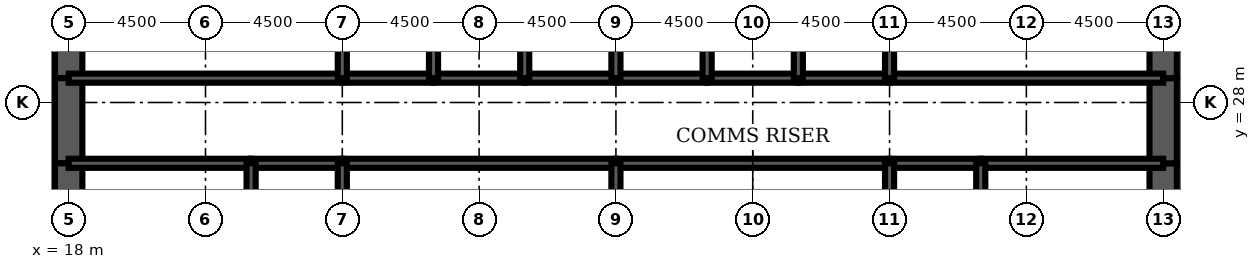
"""IFC4 building model, lengths in metres.
Left out: names, types, materials, properties, quantities, classifications, styles, units other than length and angle.
Written with IfcOpenShell. Run it as: python <this file> out.ifc"""

import sys

from ifc_helpers import new_model, si_unit, direction, frame, frame_2d, origin, place, context, subcontext, project, spatial, rectangle, extrude, element, fill, save


model = new_model("IFC4")
c1 = context("Model", 3, precision=1e-05, world=origin(), true_north=direction((0.0, 1.0)))
c2 = subcontext(c1, "Body", "Model", "MODEL_VIEW")
j1 = project(units=[si_unit("LENGTHUNIT", "METRE"), si_unit("PLANEANGLEUNIT", "RADIAN")], contexts=[c1])
p1 = place(None, origin())
s1 = spatial("IfcSite", under=j1, at=p1, CompositionType="ELEMENT")
p2 = place(p1, origin())
s2 = spatial("IfcBuilding", under=s1, at=p2, CompositionType="ELEMENT")
p3 = place(p2, frame((0.0, 0.0, 104.7)))
s3 = spatial("IfcBuildingStorey", under=s2, at=p3, CompositionType="ELEMENT", Elevation=104.7)
p4 = place(p3, frame((18.0, 32.0, 0.0), z_axis=(0.0, 0.0, 1.0), x_axis=(0.0, -1.0, 0.0)))
e1 = element("IfcWall", 1, at=p4, inside=s3, PredefinedType="SHEAR", context=c2, shape_type="SweptSolid", body=[
    extrude(rectangle(XDim=3.2, YDim=0.9, at=frame_2d((1.6, 0.0))), origin(), (0.0, 0.0, 1.0), 4.2),
])
p5 = place(p3, frame((18.0, 28.8, 0.0), z_axis=(0.0, 0.0, 1.0), x_axis=(0.0, -1.0, 0.0)))
e2 = element("IfcWall", 2, at=p5, inside=s3, PredefinedType="SHEAR", context=c2, shape_type="SweptSolid", body=[
    extrude(rectangle(XDim=2.8, YDim=0.9, at=frame_2d((1.4, 0.0))), origin(), (0.0, 0.0, 1.0), 4.2),
])
p6 = place(p5, frame((0.4, 0.0, 0.0)))
e3 = element("IfcOpeningElement", 3, at=p6, cuts=e2, PredefinedType="OPENING", context=c2, shape_type="SweptSolid", body=[
    extrude(rectangle(XDim=1.8, YDim=2.1, at=frame_2d((0.9, 1.05))), frame((0.0, 0.46, 0.0), z_axis=(0.0, -1.0, 0.0), x_axis=(1.0, 0.0, 0.0)), (0.0, 0.0, 1.0), 0.92),
])
for number, where, z_axis, x_axis in (
    (4, (18.0, 26.0, 0.0), (0.0, 0.0, 1.0), (0.0, -1.0, 0.0)),
    (5, (54.0, 22.0, 0.0), (0.0, 0.0, 1.0), (0.0, 1.0, 0.0)),
):
    element("IfcWall", number, at=place(p3, frame(where, z_axis=z_axis, x_axis=x_axis)), inside=s3, PredefinedType="SHEAR", context=c2, shape_type="SweptSolid", body=[
        extrude(rectangle(XDim=4.0, YDim=0.9, at=frame_2d((2.0, 0.0))), origin(), (0.0, 0.0, 1.0), 4.2),
    ])
p7 = place(p3, frame((54.0, 26.0, 0.0), z_axis=(0.0, 0.0, 1.0), x_axis=(0.0, 1.0, 0.0)))
e6 = element("IfcWall", 6, at=p7, inside=s3, PredefinedType="SHEAR", context=c2, shape_type="SweptSolid", body=[
    extrude(rectangle(XDim=2.8, YDim=0.9, at=frame_2d((1.4, 0.0))), origin(), (0.0, 0.0, 1.0), 4.2),
])
p8 = place(p7, frame((0.6, 0.0, 0.0)))
e7 = element("IfcOpeningElement", 7, at=p8, cuts=e6, PredefinedType="OPENING", context=c2, shape_type="SweptSolid", body=[
    extrude(rectangle(XDim=1.8, YDim=2.1, at=frame_2d((0.9, 1.05))), frame((0.0, 0.46, 0.0), z_axis=(0.0, -1.0, 0.0), x_axis=(1.0, 0.0, 0.0)), (0.0, 0.0, 1.0), 0.92),
])
p9 = place(p3, frame((54.0, 28.8, 0.0), z_axis=(0.0, 0.0, 1.0), x_axis=(0.0, 1.0, 0.0)))
e8 = element("IfcWall", 8, at=p9, inside=s3, PredefinedType="SHEAR", context=c2, shape_type="SweptSolid", body=[
    extrude(rectangle(XDim=3.2, YDim=0.9, at=frame_2d((1.6, 0.0))), origin(), (0.0, 0.0, 1.0), 4.2),
])
p10 = place(p3, frame((18.0, 28.8, 0.0), z_axis=(0.0, 0.0, 1.0), x_axis=(1.0, 0.0, 0.0)))
e9 = element("IfcWall", 9, at=p10, inside=s3, PredefinedType="SOLIDWALL", context=c2, shape_type="SweptSolid", body=[
    extrude(rectangle(XDim=9.0, YDim=0.3, at=frame_2d((4.5, 0.0))), origin(), (0.0, 0.0, 1.0), 4.2),
])
p11 = place(p10, frame((0.65, 0.0, 0.0)))
e10 = element("IfcOpeningElement", 10, at=p11, cuts=e9, PredefinedType="OPENING", context=c2, shape_type="SweptSolid", body=[
    extrude(rectangle(XDim=1.0, YDim=2.1, at=frame_2d((0.5, 1.05))), frame((0.0, 0.16, 0.0), z_axis=(0.0, -1.0, 0.0), x_axis=(1.0, 0.0, 0.0)), (0.0, 0.0, 1.0), 0.32),
])
p12 = place(p3, frame((27.0, 28.8, 0.0), z_axis=(0.0, 0.0, 1.0), x_axis=(1.0, 0.0, 0.0)))
e11 = element("IfcWall", 11, at=p12, inside=s3, PredefinedType="SOLIDWALL", context=c2, shape_type="SweptSolid", body=[
    extrude(rectangle(XDim=3.0, YDim=0.3, at=frame_2d((1.5, 0.0))), origin(), (0.0, 0.0, 1.0), 4.2),
])
p13 = place(p12, frame((0.95, 0.0, 0.0)))
e12 = element("IfcOpeningElement", 12, at=p13, cuts=e11, PredefinedType="OPENING", context=c2, shape_type="SweptSolid", body=[
    extrude(rectangle(XDim=1.1, YDim=2.2, at=frame_2d((0.55, 1.1))), frame((0.0, 0.16, 0.0), z_axis=(0.0, -1.0, 0.0), x_axis=(1.0, 0.0, 0.0)), (0.0, 0.0, 1.0), 0.32),
])
p14 = place(p3, frame((30.0, 28.8, 0.0), z_axis=(0.0, 0.0, 1.0), x_axis=(1.0, 0.0, 0.0)))
e13 = element("IfcWall", 13, at=p14, inside=s3, PredefinedType="SOLIDWALL", context=c2, shape_type="SweptSolid", body=[
    extrude(rectangle(XDim=3.0, YDim=0.3, at=frame_2d((1.5, 0.0))), origin(), (0.0, 0.0, 1.0), 4.2),
])
p15 = place(p14, frame((0.95, 0.0, 0.0)))
e14 = element("IfcOpeningElement", 14, at=p15, cuts=e13, PredefinedType="OPENING", context=c2, shape_type="SweptSolid", body=[
    extrude(rectangle(XDim=1.1, YDim=2.2, at=frame_2d((0.55, 1.1))), frame((0.0, 0.16, 0.0), z_axis=(0.0, -1.0, 0.0), x_axis=(1.0, 0.0, 0.0)), (0.0, 0.0, 1.0), 0.32),
])
p16 = place(p3, frame((33.0, 28.8, 0.0), z_axis=(0.0, 0.0, 1.0), x_axis=(1.0, 0.0, 0.0)))
e15 = element("IfcWall", 15, at=p16, inside=s3, PredefinedType="SOLIDWALL", context=c2, shape_type="SweptSolid", body=[
    extrude(rectangle(XDim=3.0, YDim=0.3, at=frame_2d((1.5, 0.0))), origin(), (0.0, 0.0, 1.0), 4.2),
])
p17 = place(p16, frame((0.95, 0.0, 0.0)))
e16 = element("IfcOpeningElement", 16, at=p17, cuts=e15, PredefinedType="OPENING", context=c2, shape_type="SweptSolid", body=[
    extrude(rectangle(XDim=1.1, YDim=2.2, at=frame_2d((0.55, 1.1))), frame((0.0, 0.16, 0.0), z_axis=(0.0, -1.0, 0.0), x_axis=(1.0, 0.0, 0.0)), (0.0, 0.0, 1.0), 0.32),
])
for number, where, z_axis, x_axis in (
    (17, (36.0, 28.8, 0.0), (0.0, 0.0, 1.0), (1.0, 0.0, 0.0)),
    (18, (39.0, 28.8, 0.0), (0.0, 0.0, 1.0), (1.0, 0.0, 0.0)),
):
    element("IfcWall", number, at=place(p3, frame(where, z_axis=z_axis, x_axis=x_axis)), inside=s3, PredefinedType="SOLIDWALL", context=c2, shape_type="SweptSolid", body=[
        extrude(rectangle(XDim=3.0, YDim=0.3, at=frame_2d((1.5, 0.0))), origin(), (0.0, 0.0, 1.0), 4.2),
    ])
p18 = place(p3, frame((42.0, 28.8, 0.0), z_axis=(0.0, 0.0, 1.0), x_axis=(1.0, 0.0, 0.0)))
e19 = element("IfcWall", 19, at=p18, inside=s3, PredefinedType="SOLIDWALL", context=c2, shape_type="SweptSolid", body=[
    extrude(rectangle(XDim=3.0, YDim=0.3, at=frame_2d((1.5, 0.0))), origin(), (0.0, 0.0, 1.0), 4.2),
])
p19 = place(p18, frame((0.95, 0.0, 0.0)))
e20 = element("IfcOpeningElement", 20, at=p19, cuts=e19, PredefinedType="OPENING", context=c2, shape_type="SweptSolid", body=[
    extrude(rectangle(XDim=1.1, YDim=2.2, at=frame_2d((0.55, 1.1))), frame((0.0, 0.16, 0.0), z_axis=(0.0, -1.0, 0.0), x_axis=(1.0, 0.0, 0.0)), (0.0, 0.0, 1.0), 0.32),
])
p20 = place(p3, frame((45.0, 28.8, 0.0), z_axis=(0.0, 0.0, 1.0), x_axis=(1.0, 0.0, 0.0)))
e21 = element("IfcWall", 21, at=p20, inside=s3, PredefinedType="SOLIDWALL", context=c2, shape_type="SweptSolid", body=[
    extrude(rectangle(XDim=9.0, YDim=0.3, at=frame_2d((4.5, 0.0))), origin(), (0.0, 0.0, 1.0), 4.2),
])
p21 = place(p20, frame((7.35, 0.0, 0.0)))
e22 = element("IfcOpeningElement", 22, at=p21, cuts=e21, PredefinedType="OPENING", context=c2, shape_type="SweptSolid", body=[
    extrude(rectangle(XDim=1.0, YDim=2.1, at=frame_2d((0.5, 1.05))), frame((0.0, 0.16, 0.0), z_axis=(0.0, -1.0, 0.0), x_axis=(1.0, 0.0, 0.0)), (0.0, 0.0, 1.0), 0.32),
])
p22 = place(p3, frame((18.0, 26.0, 0.0), z_axis=(0.0, 0.0, 1.0), x_axis=(1.0, 0.0, 0.0)))
e23 = element("IfcWall", 23, at=p22, inside=s3, PredefinedType="SOLIDWALL", context=c2, shape_type="SweptSolid", body=[
    extrude(rectangle(XDim=6.0, YDim=0.3, at=frame_2d((3.0, 0.0))), origin(), (0.0, 0.0, 1.0), 4.2),
])
p23 = place(p3, frame((24.0, 26.0, 0.0), z_axis=(0.0, 0.0, 1.0), x_axis=(1.0, 0.0, 0.0)))
e24 = element("IfcWall", 24, at=p23, inside=s3, PredefinedType="SOLIDWALL", context=c2, shape_type="SweptSolid", body=[
    extrude(rectangle(XDim=3.0, YDim=0.3, at=frame_2d((1.5, 0.0))), origin(), (0.0, 0.0, 1.0), 4.2),
])
for number, where, z_axis, x_axis in (
    (25, (27.0, 26.0, 0.0), (0.0, 0.0, 1.0), (1.0, 0.0, 0.0)),
    (26, (36.0, 26.0, 0.0), (0.0, 0.0, 1.0), (1.0, 0.0, 0.0)),
):
    element("IfcWall", number, at=place(p3, frame(where, z_axis=z_axis, x_axis=x_axis)), inside=s3, PredefinedType="SOLIDWALL", context=c2, shape_type="SweptSolid", body=[
        extrude(rectangle(XDim=9.0, YDim=0.3, at=frame_2d((4.5, 0.0))), origin(), (0.0, 0.0, 1.0), 4.2),
    ])
p24 = place(p3, frame((45.0, 26.0, 0.0), z_axis=(0.0, 0.0, 1.0), x_axis=(1.0, 0.0, 0.0)))
e27 = element("IfcWall", 27, at=p24, inside=s3, PredefinedType="SOLIDWALL", context=c2, shape_type="SweptSolid", body=[
    extrude(rectangle(XDim=3.0, YDim=0.3, at=frame_2d((1.5, 0.0))), origin(), (0.0, 0.0, 1.0), 4.2),
])
p25 = place(p3, frame((48.0, 26.0, 0.0), z_axis=(0.0, 0.0, 1.0), x_axis=(1.0, 0.0, 0.0)))
e28 = element("IfcWall", 28, at=p25, inside=s3, PredefinedType="SOLIDWALL", context=c2, shape_type="SweptSolid", body=[
    extrude(rectangle(XDim=6.0, YDim=0.3, at=frame_2d((3.0, 0.0))), origin(), (0.0, 0.0, 1.0), 4.2),
])
for number, where, z_axis, x_axis in (
    (29, (27.0, 28.8, 0.0), (0.0, 0.0, 1.0), (0.0, 1.0, 0.0)),
    (30, (30.0, 28.8, 0.0), (0.0, 0.0, 1.0), (0.0, 1.0, 0.0)),
    (31, (33.0, 28.8, 0.0), (0.0, 0.0, 1.0), (0.0, 1.0, 0.0)),
    (32, (36.0, 28.8, 0.0), (0.0, 0.0, 1.0), (0.0, 1.0, 0.0)),
    (33, (39.0, 28.8, 0.0), (0.0, 0.0, 1.0), (0.0, 1.0, 0.0)),
    (34, (42.0, 28.8, 0.0), (0.0, 0.0, 1.0), (0.0, 1.0, 0.0)),
    (35, (45.0, 28.8, 0.0), (0.0, 0.0, 1.0), (0.0, 1.0, 0.0)),
):
    element("IfcWall", number, at=place(p3, frame(where, z_axis=z_axis, x_axis=x_axis)), inside=s3, PredefinedType="SOLIDWALL", context=c2, shape_type="SweptSolid", body=[
        extrude(rectangle(XDim=3.2, YDim=0.3, at=frame_2d((1.6, 0.0))), origin(), (0.0, 0.0, 1.0), 4.2),
    ])
for number, where, z_axis, x_axis in (
    (36, (24.0, 22.0, 0.0), (0.0, 0.0, 1.0), (0.0, 1.0, 0.0)),
    (37, (27.0, 22.0, 0.0), (0.0, 0.0, 1.0), (0.0, 1.0, 0.0)),
    (38, (36.0, 22.0, 0.0), (0.0, 0.0, 1.0), (0.0, 1.0, 0.0)),
    (39, (45.0, 22.0, 0.0), (0.0, 0.0, 1.0), (0.0, 1.0, 0.0)),
    (40, (48.0, 22.0, 0.0), (0.0, 0.0, 1.0), (0.0, 1.0, 0.0)),
):
    element("IfcWall", number, at=place(p3, frame(where, z_axis=z_axis, x_axis=x_axis)), inside=s3, PredefinedType="SOLIDWALL", context=c2, shape_type="SweptSolid", body=[
        extrude(rectangle(XDim=4.0, YDim=0.3, at=frame_2d((2.0, 0.0))), origin(), (0.0, 0.0, 1.0), 4.2),
    ])
p26 = place(p3, frame((38.0, 22.15, 0.0), z_axis=(0.0, 0.0, 1.0), x_axis=(0.0, 1.0, 0.0)))
e41 = element("IfcWall", 41, at=p26, inside=s3, PredefinedType="PARTITIONING", context=c2, shape_type="SweptSolid", body=[
    extrude(rectangle(XDim=3.7, YDim=0.15, at=frame_2d((1.85, 0.0))), origin(), (0.0, 0.0, 1.0), 3.0),
])
p27 = place(p26, frame((2.2, 0.0, 0.0)))
e42 = element("IfcOpeningElement", 42, at=p27, cuts=e41, PredefinedType="OPENING", context=c2, shape_type="SweptSolid", body=[
    extrude(rectangle(XDim=1.0, YDim=2.1, at=frame_2d((0.5, 1.05))), frame((0.0, 0.085, 0.0), z_axis=(0.0, -1.0, 0.0), x_axis=(1.0, 0.0, 0.0)), (0.0, 0.0, 1.0), 0.17),
])
for number, where, z_axis, x_axis in (
    (43, (20.025, 22.15, 0.0), (0.0, 0.0, 1.0), (0.0, 1.0, 0.0)),
    (44, (51.975, 22.15, 0.0), (0.0, 0.0, 1.0), (0.0, 1.0, 0.0)),
):
    element("IfcWall", number, at=place(p3, frame(where, z_axis=z_axis, x_axis=x_axis)), inside=s3, PredefinedType="PARTITIONING", context=c2, shape_type="SweptSolid", body=[
        extrude(rectangle(XDim=3.7, YDim=0.15, at=frame_2d((1.85, 0.0))), origin(), (0.0, 0.0, 1.0), 3.0),
    ])
p28 = place(p27, origin())
e45 = element("IfcDoor", 45, at=p28, inside=s3, OperationType="SINGLE_SWING_RIGHT", PredefinedType="DOOR", context=c2, shape_type="SweptSolid", body=[
    extrude(rectangle(XDim=1.0, YDim=2.1, at=frame_2d((0.5, 1.05))), frame((0.0, 0.025, 0.0), z_axis=(0.0, -1.0, 0.0), x_axis=(1.0, 0.0, 0.0)), (0.0, 0.0, 1.0), 0.05),
])
fill(e42, e45)
p29 = place(p19, origin())
e46 = element("IfcDoor", 46, at=p29, inside=s3, OperationType="DOUBLE_DOOR_SLIDING", PredefinedType="USERDEFINED", context=c2, shape_type="SweptSolid", body=[
    extrude(rectangle(XDim=1.1, YDim=2.2, at=frame_2d((0.55, 1.1))), frame((0.0, 0.025, 0.0), z_axis=(0.0, -1.0, 0.0), x_axis=(1.0, 0.0, 0.0)), (0.0, 0.0, 1.0), 0.05),
])
fill(e20, e46)
p30 = place(p13, origin())
e47 = element("IfcDoor", 47, at=p30, inside=s3, OperationType="DOUBLE_DOOR_SLIDING", PredefinedType="USERDEFINED", context=c2, shape_type="SweptSolid", body=[
    extrude(rectangle(XDim=1.1, YDim=2.2, at=frame_2d((0.55, 1.1))), frame((0.0, 0.025, 0.0), z_axis=(0.0, -1.0, 0.0), x_axis=(1.0, 0.0, 0.0)), (0.0, 0.0, 1.0), 0.05),
])
fill(e12, e47)
p31 = place(p15, origin())
e48 = element("IfcDoor", 48, at=p31, inside=s3, OperationType="DOUBLE_DOOR_SLIDING", PredefinedType="USERDEFINED", context=c2, shape_type="SweptSolid", body=[
    extrude(rectangle(XDim=1.1, YDim=2.2, at=frame_2d((0.55, 1.1))), frame((0.0, 0.025, 0.0), z_axis=(0.0, -1.0, 0.0), x_axis=(1.0, 0.0, 0.0)), (0.0, 0.0, 1.0), 0.05),
])
fill(e14, e48)
p32 = place(p17, origin())
e49 = element("IfcDoor", 49, at=p32, inside=s3, OperationType="DOUBLE_DOOR_SLIDING", PredefinedType="USERDEFINED", context=c2, shape_type="SweptSolid", body=[
    extrude(rectangle(XDim=1.1, YDim=2.2, at=frame_2d((0.55, 1.1))), frame((0.0, 0.025, 0.0), z_axis=(0.0, -1.0, 0.0), x_axis=(1.0, 0.0, 0.0)), (0.0, 0.0, 1.0), 0.05),
])
fill(e16, e49)
p33 = place(p11, origin())
e50 = element("IfcDoor", 50, at=p33, inside=s3, OperationType="SINGLE_SWING_LEFT", PredefinedType="DOOR", context=c2, shape_type="SweptSolid", body=[
    extrude(rectangle(XDim=1.0, YDim=2.1, at=frame_2d((0.5, 1.05))), frame((0.0, 0.025, 0.0), z_axis=(0.0, -1.0, 0.0), x_axis=(1.0, 0.0, 0.0)), (0.0, 0.0, 1.0), 0.05),
])
fill(e10, e50)
p34 = place(p21, origin())
e51 = element("IfcDoor", 51, at=p34, inside=s3, OperationType="SINGLE_SWING_RIGHT", PredefinedType="DOOR", context=c2, shape_type="SweptSolid", body=[
    extrude(rectangle(XDim=1.0, YDim=2.1, at=frame_2d((0.5, 1.05))), frame((0.0, 0.025, 0.0), z_axis=(0.0, -1.0, 0.0), x_axis=(1.0, 0.0, 0.0)), (0.0, 0.0, 1.0), 0.05),
])
fill(e22, e51)
p35 = place(p6, origin())
e52 = element("IfcDoor", 52, at=p35, inside=s3, OperationType="SINGLE_SWING_LEFT", PredefinedType="DOOR", context=c2, shape_type="SweptSolid", body=[
    extrude(rectangle(XDim=1.8, YDim=2.1, at=frame_2d((0.9, 1.05))), frame((0.0, 0.45, 0.0), z_axis=(0.0, -1.0, 0.0), x_axis=(1.0, 0.0, 0.0)), (0.0, 0.0, 1.0), 0.899),
])
fill(e3, e52)
p36 = place(p8, origin())
e53 = element("IfcDoor", 53, at=p36, inside=s3, OperationType="SINGLE_SWING_LEFT", PredefinedType="DOOR", context=c2, shape_type="SweptSolid", body=[
    extrude(rectangle(XDim=1.8, YDim=2.1, at=frame_2d((0.9, 1.05))), frame((0.0, 0.45, 0.0), z_axis=(0.0, -1.0, 0.0), x_axis=(1.0, 0.0, 0.0)), (0.0, 0.0, 1.0), 0.899),
])
fill(e7, e53)
save(model, sys.argv[1])
